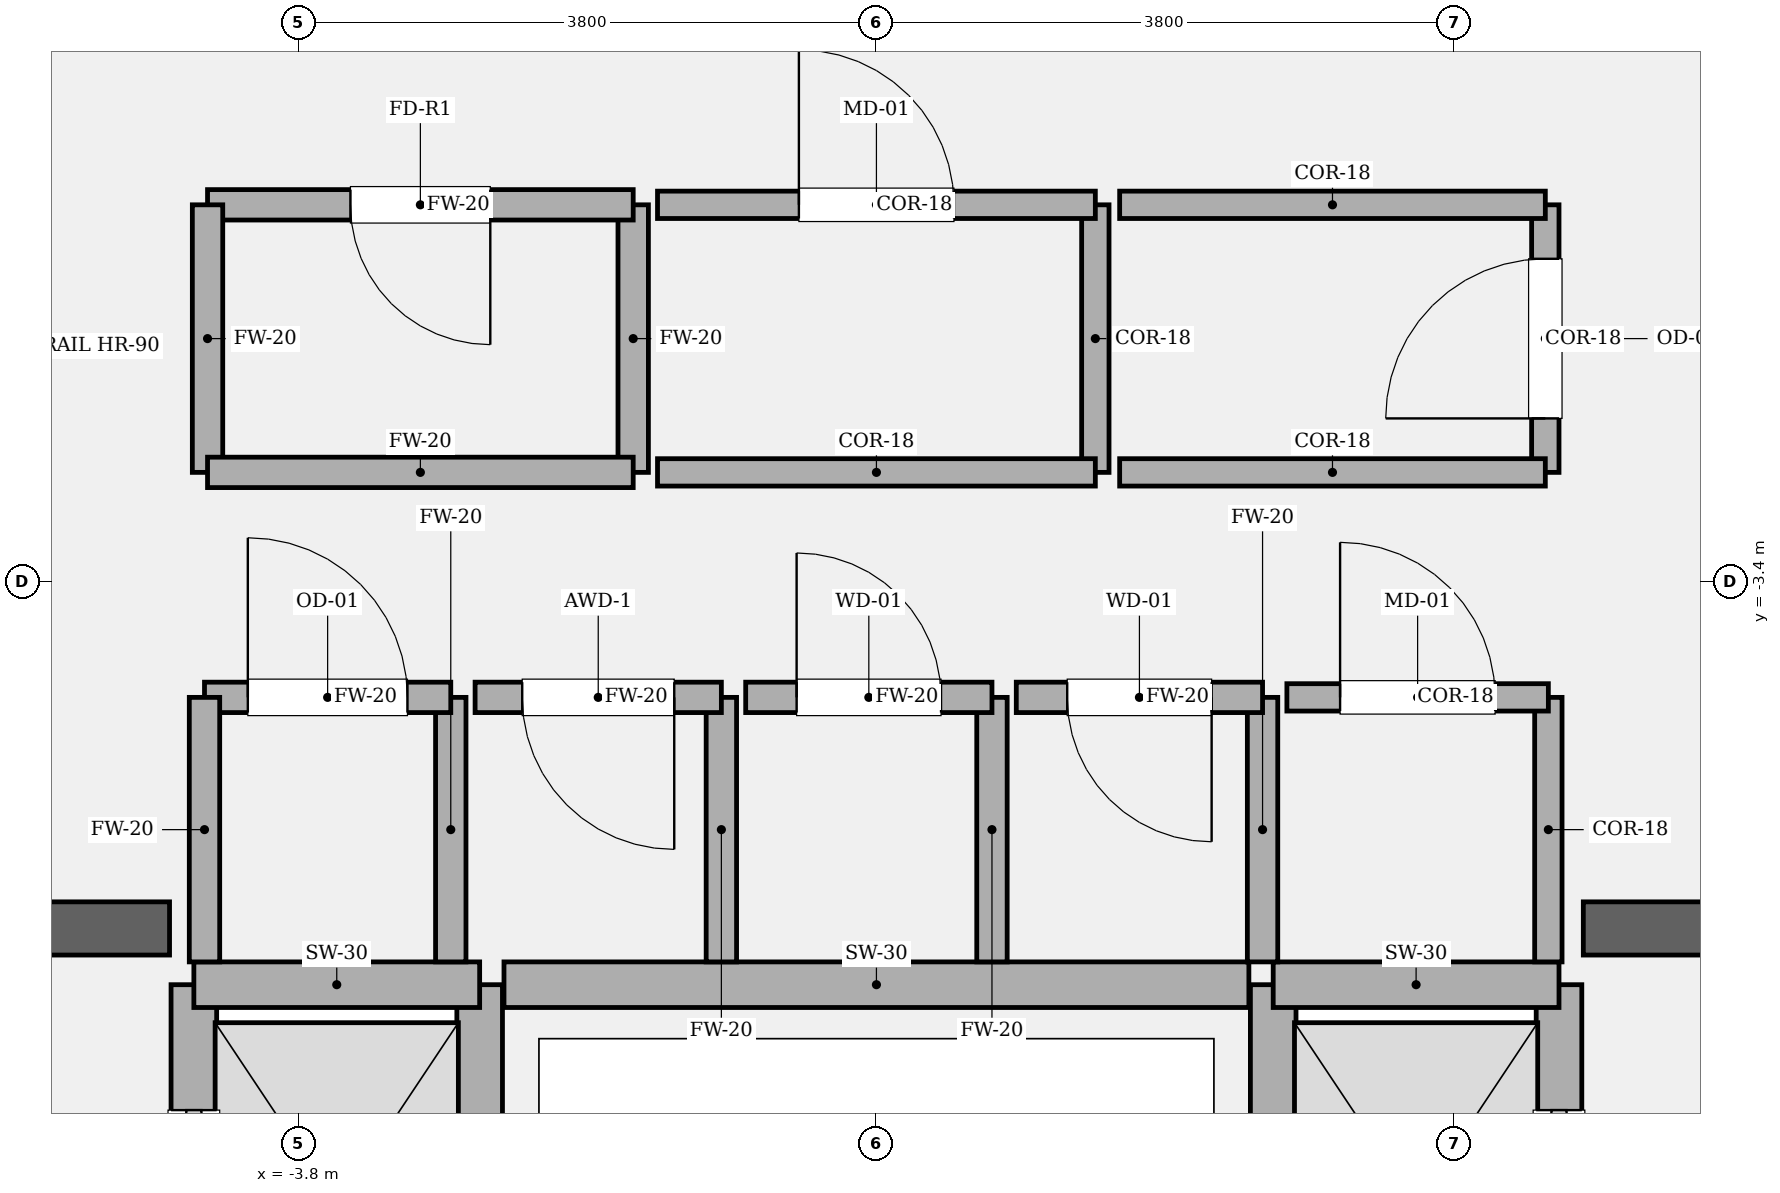
"""IFC4 building model, lengths in metres.
Left out: names, types, materials, properties, quantities, classifications, styles, units other than length and angle.
Written with IfcOpenShell. Run it as: python <this file> out.ifc"""

import sys

from ifc_helpers import new_model, si_unit, direction, frame, frame_2d, origin, place, context, subcontext, project, spatial, rectangle, extrude, element, fill, save


model = new_model("IFC4")
c1 = context("Model", 3, precision=1e-05, world=origin(), true_north=direction((0.0, 1.0)))
c2 = subcontext(c1, "Body", "Model", "MODEL_VIEW")
j1 = project(units=[si_unit("LENGTHUNIT", "METRE"), si_unit("PLANEANGLEUNIT", "RADIAN")], contexts=[c1])
p1 = place(None, origin())
s1 = spatial("IfcSite", under=j1, at=p1, CompositionType="ELEMENT")
p2 = place(p1, origin())
s2 = spatial("IfcBuilding", under=s1, at=p2, CompositionType="ELEMENT")
p3 = place(p2, frame((0.0, 0.0, 228.9)))
s3 = spatial("IfcBuildingStorey", under=s2, at=p3, CompositionType="ELEMENT", Elevation=228.9)
p4 = place(p3, frame((-9.875, -5.68, 0.0), z_axis=(0.0, 0.0, 1.0), x_axis=(1.0, 0.0, 0.0)))
e1 = element("IfcWall", 1, at=p4, inside=s3, PredefinedType="SOLIDWALL", context=c2, shape_type="SweptSolid", body=[
    extrude(rectangle(XDim=5.225, YDim=0.35, at=frame_2d((2.613, 0.0))), origin(), (0.0, 0.0, 1.0), 4.05),
])
p5 = place(p4, frame((1.335, 0.0, 0.0)))
e2 = element("IfcOpeningElement", 2, at=p5, cuts=e1, PredefinedType="OPENING", context=c2, shape_type="SweptSolid", body=[
    extrude(rectangle(XDim=1.18, YDim=2.2, at=frame_2d((0.59, 1.1))), frame((0.0, 0.185, 0.0), z_axis=(0.0, -1.0, 0.0), x_axis=(1.0, 0.0, 0.0)), (0.0, 0.0, 1.0), 0.37),
])
p6 = place(p3, frame((4.65, -5.68, 0.0), z_axis=(0.0, 0.0, 1.0), x_axis=(1.0, 0.0, 0.0)))
e3 = element("IfcWall", 3, at=p6, inside=s3, PredefinedType="SOLIDWALL", context=c2, shape_type="SweptSolid", body=[
    extrude(rectangle(XDim=5.225, YDim=0.35, at=frame_2d((2.613, 0.0))), origin(), (0.0, 0.0, 1.0), 4.05),
])
p7 = place(p6, frame((2.71, 0.0, 0.0)))
e4 = element("IfcOpeningElement", 4, at=p7, cuts=e3, PredefinedType="OPENING", context=c2, shape_type="SweptSolid", body=[
    extrude(rectangle(XDim=1.18, YDim=2.2, at=frame_2d((0.59, 1.1))), frame((0.0, 0.185, 0.0), z_axis=(0.0, -1.0, 0.0), x_axis=(1.0, 0.0, 0.0)), (0.0, 0.0, 1.0), 0.37),
])
p8 = place(p3, frame((-4.49, -8.82, 0.0), z_axis=(0.0, 0.0, 1.0), x_axis=(0.0, 1.0, 0.0)))
e5 = element("IfcWall", 5, at=p8, inside=s3, PredefinedType="SOLIDWALL", context=c2, shape_type="SweptSolid", body=[
    extrude(rectangle(XDim=2.77, YDim=0.3, at=frame_2d((1.385, 0.0))), origin(), (0.0, 0.0, 1.0), 3.83),
])
p9 = place(p8, frame((0.825, 0.0, 0.0)))
e6 = element("IfcOpeningElement", 6, at=p9, cuts=e5, PredefinedType="OPENING", context=c2, shape_type="SweptSolid", body=[
    extrude(rectangle(XDim=1.12, YDim=2.25, at=frame_2d((0.56, 1.125))), frame((0.0, 0.16, 0.0), z_axis=(0.0, -1.0, 0.0), x_axis=(1.0, 0.0, 0.0)), (0.0, 0.0, 1.0), 0.32),
])
p10 = place(p3, frame((-2.61, -8.82, 0.0), z_axis=(0.0, 0.0, 1.0), x_axis=(0.0, 1.0, 0.0)))
e7 = element("IfcWall", 7, at=p10, inside=s3, PredefinedType="SOLIDWALL", context=c2, shape_type="SweptSolid", body=[
    extrude(rectangle(XDim=2.77, YDim=0.3, at=frame_2d((1.385, 0.0))), origin(), (0.0, 0.0, 1.0), 3.83),
])
p11 = place(p3, frame((-4.49, -6.05, 0.0), z_axis=(0.0, 0.0, 1.0), x_axis=(1.0, 0.0, 0.0)))
e8 = element("IfcWall", 8, at=p11, inside=s3, PredefinedType="SOLIDWALL", context=c2, shape_type="SweptSolid", body=[
    extrude(rectangle(XDim=1.88, YDim=0.3, at=frame_2d((0.94, 0.0))), origin(), (0.0, 0.0, 1.0), 3.83),
])
p12 = place(p3, frame((4.49, -8.82, 0.0), z_axis=(0.0, 0.0, 1.0), x_axis=(0.0, 1.0, 0.0)))
e9 = element("IfcWall", 9, at=p12, inside=s3, PredefinedType="SOLIDWALL", context=c2, shape_type="SweptSolid", body=[
    extrude(rectangle(XDim=2.77, YDim=0.3, at=frame_2d((1.385, 0.0))), origin(), (0.0, 0.0, 1.0), 3.83),
])
p13 = place(p12, frame((0.825, 0.0, 0.0)))
e10 = element("IfcOpeningElement", 10, at=p13, cuts=e9, PredefinedType="OPENING", context=c2, shape_type="SweptSolid", body=[
    extrude(rectangle(XDim=1.12, YDim=2.25, at=frame_2d((0.56, 1.125))), frame((0.0, 0.16, 0.0), z_axis=(0.0, -1.0, 0.0), x_axis=(1.0, 0.0, 0.0)), (0.0, 0.0, 1.0), 0.32),
])
p14 = place(p3, frame((2.61, -8.82, 0.0), z_axis=(0.0, 0.0, 1.0), x_axis=(0.0, 1.0, 0.0)))
e11 = element("IfcWall", 11, at=p14, inside=s3, PredefinedType="SOLIDWALL", context=c2, shape_type="SweptSolid", body=[
    extrude(rectangle(XDim=2.77, YDim=0.3, at=frame_2d((1.385, 0.0))), origin(), (0.0, 0.0, 1.0), 3.83),
])
p15 = place(p3, frame((2.61, -6.05, 0.0), z_axis=(0.0, 0.0, 1.0), x_axis=(1.0, 0.0, 0.0)))
e12 = element("IfcWall", 12, at=p15, inside=s3, PredefinedType="SOLIDWALL", context=c2, shape_type="SweptSolid", body=[
    extrude(rectangle(XDim=1.88, YDim=0.3, at=frame_2d((0.94, 0.0))), origin(), (0.0, 0.0, 1.0), 3.83),
])
p16 = place(p3, frame((-2.45, -6.05, 0.0), z_axis=(0.0, 0.0, 1.0), x_axis=(1.0, 0.0, 0.0)))
e13 = element("IfcWall", 13, at=p16, inside=s3, PredefinedType="SOLIDWALL", context=c2, shape_type="SweptSolid", body=[
    extrude(rectangle(XDim=4.9, YDim=0.3, at=frame_2d((2.45, 0.0))), origin(), (0.0, 0.0, 1.0), 3.83),
])
p17 = place(p3, frame((-2.8, -5.9, 0.0), z_axis=(0.0, 0.0, 1.0), x_axis=(0.0, 1.0, 0.0)))
e14 = element("IfcWall", 14, at=p17, inside=s3, PredefinedType="SOLIDWALL", context=c2, shape_type="SweptSolid", body=[
    extrude(rectangle(XDim=1.74, YDim=0.2, at=frame_2d((0.87, 0.0))), origin(), (0.0, 0.0, 1.0), 3.83),
])
p18 = place(p3, frame((-2.8, -4.16, 0.0), z_axis=(0.0, 0.0, 1.0), x_axis=(-1.0, 0.0, 0.0)))
e15 = element("IfcWall", 15, at=p18, inside=s3, PredefinedType="SOLIDWALL", context=c2, shape_type="SweptSolid", body=[
    extrude(rectangle(XDim=1.62, YDim=0.2, at=frame_2d((0.81, 0.0))), origin(), (0.0, 0.0, 1.0), 3.83),
])
p19 = place(p18, frame((0.285, 0.0, 0.0)))
e16 = element("IfcOpeningElement", 16, at=p19, cuts=e15, PredefinedType="OPENING", context=c2, shape_type="SweptSolid", body=[
    extrude(rectangle(XDim=1.05, YDim=2.2, at=frame_2d((0.525, 1.1))), frame((0.0, 0.11, 0.0), z_axis=(0.0, -1.0, 0.0), x_axis=(1.0, 0.0, 0.0)), (0.0, 0.0, 1.0), 0.22),
])
for number, where, z_axis, x_axis in (
    (17, (-4.42, -4.16, 0.0), (0.0, 0.0, 1.0), (0.0, -1.0, 0.0)),
    (18, (-1.02, -5.9, 0.0), (0.0, 0.0, 1.0), (0.0, 1.0, 0.0)),
):
    element("IfcWall", number, at=place(p3, frame(where, z_axis=z_axis, x_axis=x_axis)), inside=s3, PredefinedType="SOLIDWALL", context=c2, shape_type="SweptSolid", body=[
        extrude(rectangle(XDim=1.74, YDim=0.2, at=frame_2d((0.87, 0.0))), origin(), (0.0, 0.0, 1.0), 3.83),
    ])
p20 = place(p3, frame((-1.02, -4.16, 0.0), z_axis=(0.0, 0.0, 1.0), x_axis=(-1.0, 0.0, 0.0)))
e19 = element("IfcWall", 19, at=p20, inside=s3, PredefinedType="SOLIDWALL", context=c2, shape_type="SweptSolid", body=[
    extrude(rectangle(XDim=1.62, YDim=0.2, at=frame_2d((0.81, 0.0))), origin(), (0.0, 0.0, 1.0), 3.83),
])
p21 = place(p20, frame((0.31, 0.0, 0.0)))
e20 = element("IfcOpeningElement", 20, at=p21, cuts=e19, PredefinedType="OPENING", context=c2, shape_type="SweptSolid", body=[
    extrude(rectangle(XDim=1.0, YDim=2.15, at=frame_2d((0.5, 1.075))), frame((0.0, 0.11, 0.0), z_axis=(0.0, -1.0, 0.0), x_axis=(1.0, 0.0, 0.0)), (0.0, 0.0, 1.0), 0.22),
])
p22 = place(p3, frame((0.76, -5.9, 0.0), z_axis=(0.0, 0.0, 1.0), x_axis=(0.0, 1.0, 0.0)))
e21 = element("IfcWall", 21, at=p22, inside=s3, PredefinedType="SOLIDWALL", context=c2, shape_type="SweptSolid", body=[
    extrude(rectangle(XDim=1.74, YDim=0.2, at=frame_2d((0.87, 0.0))), origin(), (0.0, 0.0, 1.0), 3.83),
])
p23 = place(p3, frame((0.76, -4.16, 0.0), z_axis=(0.0, 0.0, 1.0), x_axis=(-1.0, 0.0, 0.0)))
e22 = element("IfcWall", 22, at=p23, inside=s3, PredefinedType="SOLIDWALL", context=c2, shape_type="SweptSolid", body=[
    extrude(rectangle(XDim=1.62, YDim=0.2, at=frame_2d((0.81, 0.0))), origin(), (0.0, 0.0, 1.0), 3.83),
])
p24 = place(p23, frame((0.335, 0.0, 0.0)))
e23 = element("IfcOpeningElement", 23, at=p24, cuts=e22, PredefinedType="OPENING", context=c2, shape_type="SweptSolid", body=[
    extrude(rectangle(XDim=0.95, YDim=2.15, at=frame_2d((0.475, 1.075))), frame((0.0, 0.11, 0.0), z_axis=(0.0, -1.0, 0.0), x_axis=(1.0, 0.0, 0.0)), (0.0, 0.0, 1.0), 0.22),
])
p25 = place(p3, frame((2.54, -5.9, 0.0), z_axis=(0.0, 0.0, 1.0), x_axis=(0.0, 1.0, 0.0)))
e24 = element("IfcWall", 24, at=p25, inside=s3, PredefinedType="SOLIDWALL", context=c2, shape_type="SweptSolid", body=[
    extrude(rectangle(XDim=1.74, YDim=0.2, at=frame_2d((0.87, 0.0))), origin(), (0.0, 0.0, 1.0), 3.83),
])
p26 = place(p3, frame((2.54, -4.16, 0.0), z_axis=(0.0, 0.0, 1.0), x_axis=(-1.0, 0.0, 0.0)))
e25 = element("IfcWall", 25, at=p26, inside=s3, PredefinedType="SOLIDWALL", context=c2, shape_type="SweptSolid", body=[
    extrude(rectangle(XDim=1.62, YDim=0.2, at=frame_2d((0.81, 0.0))), origin(), (0.0, 0.0, 1.0), 3.83),
])
p27 = place(p26, frame((0.335, 0.0, 0.0)))
e26 = element("IfcOpeningElement", 26, at=p27, cuts=e25, PredefinedType="OPENING", context=c2, shape_type="SweptSolid", body=[
    extrude(rectangle(XDim=0.95, YDim=2.15, at=frame_2d((0.475, 1.075))), frame((0.0, 0.11, 0.0), z_axis=(0.0, -1.0, 0.0), x_axis=(1.0, 0.0, 0.0)), (0.0, 0.0, 1.0), 0.22),
])
p28 = place(p3, frame((4.42, -5.9, 0.0), z_axis=(0.0, 0.0, 1.0), x_axis=(0.0, 1.0, 0.0)))
e27 = element("IfcWall", 27, at=p28, inside=s3, PredefinedType="PARTITIONING", context=c2, shape_type="SweptSolid", body=[
    extrude(rectangle(XDim=1.74, YDim=0.18, at=frame_2d((0.87, 0.0))), origin(), (0.0, 0.0, 1.0), 3.83),
])
p29 = place(p3, frame((4.42, -4.16, 0.0), z_axis=(0.0, 0.0, 1.0), x_axis=(-1.0, 0.0, 0.0)))
e28 = element("IfcWall", 28, at=p29, inside=s3, PredefinedType="PARTITIONING", context=c2, shape_type="SweptSolid", body=[
    extrude(rectangle(XDim=1.72, YDim=0.18, at=frame_2d((0.86, 0.0))), origin(), (0.0, 0.0, 1.0), 3.83),
])
p30 = place(p29, frame((0.35, 0.0, 0.0)))
e29 = element("IfcOpeningElement", 29, at=p30, cuts=e28, PredefinedType="OPENING", context=c2, shape_type="SweptSolid", body=[
    extrude(rectangle(XDim=1.02, YDim=2.2, at=frame_2d((0.51, 1.1))), frame((0.0, 0.1, 0.0), z_axis=(0.0, -1.0, 0.0), x_axis=(1.0, 0.0, 0.0)), (0.0, 0.0, 1.0), 0.2),
])
p31 = place(p3, frame((-1.6, -2.68, 0.0), z_axis=(0.0, 0.0, 1.0), x_axis=(0.0, 1.0, 0.0)))
e30 = element("IfcWall", 30, at=p31, inside=s3, PredefinedType="SOLIDWALL", context=c2, shape_type="SweptSolid", body=[
    extrude(rectangle(XDim=1.76, YDim=0.2, at=frame_2d((0.88, 0.0))), origin(), (0.0, 0.0, 1.0), 3.83),
])
p32 = place(p3, frame((-1.6, -0.92, 0.0), z_axis=(0.0, 0.0, 1.0), x_axis=(-1.0, 0.0, 0.0)))
e31 = element("IfcWall", 31, at=p32, inside=s3, PredefinedType="SOLIDWALL", context=c2, shape_type="SweptSolid", body=[
    extrude(rectangle(XDim=2.8, YDim=0.2, at=frame_2d((1.4, 0.0))), origin(), (0.0, 0.0, 1.0), 3.83),
])
p33 = place(p32, frame((0.94, 0.0, 0.0)))
e32 = element("IfcOpeningElement", 32, at=p33, cuts=e31, PredefinedType="OPENING", context=c2, shape_type="SweptSolid", body=[
    extrude(rectangle(XDim=0.92, YDim=2.1, at=frame_2d((0.46, 1.05))), frame((0.0, 0.11, 0.0), z_axis=(0.0, -1.0, 0.0), x_axis=(1.0, 0.0, 0.0)), (0.0, 0.0, 1.0), 0.22),
])
p34 = place(p3, frame((-4.4, -0.92, 0.0), z_axis=(0.0, 0.0, 1.0), x_axis=(0.0, -1.0, 0.0)))
e33 = element("IfcWall", 33, at=p34, inside=s3, PredefinedType="SOLIDWALL", context=c2, shape_type="SweptSolid", body=[
    extrude(rectangle(XDim=1.76, YDim=0.2, at=frame_2d((0.88, 0.0))), origin(), (0.0, 0.0, 1.0), 3.83),
])
p35 = place(p3, frame((-4.4, -2.68, 0.0), z_axis=(0.0, 0.0, 1.0), x_axis=(1.0, 0.0, 0.0)))
e34 = element("IfcWall", 34, at=p35, inside=s3, PredefinedType="SOLIDWALL", context=c2, shape_type="SweptSolid", body=[
    extrude(rectangle(XDim=2.8, YDim=0.2, at=frame_2d((1.4, 0.0))), origin(), (0.0, 0.0, 1.0), 3.83),
])
p36 = place(p3, frame((1.44, -2.68, 0.0), z_axis=(0.0, 0.0, 1.0), x_axis=(0.0, 1.0, 0.0)))
e35 = element("IfcWall", 35, at=p36, inside=s3, PredefinedType="PARTITIONING", context=c2, shape_type="SweptSolid", body=[
    extrude(rectangle(XDim=1.76, YDim=0.18, at=frame_2d((0.88, 0.0))), origin(), (0.0, 0.0, 1.0), 3.83),
])
p37 = place(p3, frame((1.44, -0.92, 0.0), z_axis=(0.0, 0.0, 1.0), x_axis=(-1.0, 0.0, 0.0)))
e36 = element("IfcWall", 36, at=p37, inside=s3, PredefinedType="PARTITIONING", context=c2, shape_type="SweptSolid", body=[
    extrude(rectangle(XDim=2.88, YDim=0.18, at=frame_2d((1.44, 0.0))), origin(), (0.0, 0.0, 1.0), 3.83),
])
p38 = place(p37, frame((0.93, 0.0, 0.0)))
e37 = element("IfcOpeningElement", 37, at=p38, cuts=e36, PredefinedType="OPENING", context=c2, shape_type="SweptSolid", body=[
    extrude(rectangle(XDim=1.02, YDim=2.2, at=frame_2d((0.51, 1.1))), frame((0.0, 0.1, 0.0), z_axis=(0.0, -1.0, 0.0), x_axis=(1.0, 0.0, 0.0)), (0.0, 0.0, 1.0), 0.2),
])
p39 = place(p3, frame((-1.44, -2.68, 0.0), z_axis=(0.0, 0.0, 1.0), x_axis=(1.0, 0.0, 0.0)))
e38 = element("IfcWall", 38, at=p39, inside=s3, PredefinedType="PARTITIONING", context=c2, shape_type="SweptSolid", body=[
    extrude(rectangle(XDim=2.88, YDim=0.18, at=frame_2d((1.44, 0.0))), origin(), (0.0, 0.0, 1.0), 3.83),
])
p40 = place(p3, frame((4.4, -2.68, 0.0), z_axis=(0.0, 0.0, 1.0), x_axis=(0.0, 1.0, 0.0)))
e39 = element("IfcWall", 39, at=p40, inside=s3, PredefinedType="PARTITIONING", context=c2, shape_type="SweptSolid", body=[
    extrude(rectangle(XDim=1.76, YDim=0.18, at=frame_2d((0.88, 0.0))), origin(), (0.0, 0.0, 1.0), 3.83),
])
p41 = place(p40, frame((0.355, 0.0, 0.0)))
e40 = element("IfcOpeningElement", 40, at=p41, cuts=e39, PredefinedType="OPENING", context=c2, shape_type="SweptSolid", body=[
    extrude(rectangle(XDim=1.05, YDim=2.2, at=frame_2d((0.525, 1.1))), frame((0.0, 0.1, 0.0), z_axis=(0.0, -1.0, 0.0), x_axis=(1.0, 0.0, 0.0)), (0.0, 0.0, 1.0), 0.2),
])
for number, where, z_axis, x_axis in (
    (41, (4.4, -0.92, 0.0), (0.0, 0.0, 1.0), (-1.0, 0.0, 0.0)),
    (42, (1.6, -2.68, 0.0), (0.0, 0.0, 1.0), (1.0, 0.0, 0.0)),
):
    element("IfcWall", number, at=place(p3, frame(where, z_axis=z_axis, x_axis=x_axis)), inside=s3, PredefinedType="PARTITIONING", context=c2, shape_type="SweptSolid", body=[
        extrude(rectangle(XDim=2.8, YDim=0.18, at=frame_2d((1.4, 0.0))), origin(), (0.0, 0.0, 1.0), 3.83),
    ])
p42 = place(p9, origin())
e43 = element("IfcDoor", 43, at=p42, inside=s3, OperationType="SLIDING_TO_LEFT", PredefinedType="DOOR", context=c2, shape_type="SweptSolid", body=[
    extrude(rectangle(XDim=1.12, YDim=2.25, at=frame_2d((0.56, 1.125))), frame((0.0, 0.025, 0.0), z_axis=(0.0, -1.0, 0.0), x_axis=(1.0, 0.0, 0.0)), (0.0, 0.0, 1.0), 0.05),
])
fill(e6, e43)
p43 = place(p13, origin())
e44 = element("IfcDoor", 44, at=p43, inside=s3, OperationType="SLIDING_TO_RIGHT", PredefinedType="DOOR", context=c2, shape_type="SweptSolid", body=[
    extrude(rectangle(XDim=1.12, YDim=2.25, at=frame_2d((0.56, 1.125))), frame((0.0, 0.025, 0.0), z_axis=(0.0, -1.0, 0.0), x_axis=(1.0, 0.0, 0.0)), (0.0, 0.0, 1.0), 0.05),
])
fill(e10, e44)
p44 = place(p19, origin())
e45 = element("IfcDoor", 45, at=p44, inside=s3, OperationType="SINGLE_SWING_RIGHT", PredefinedType="DOOR", context=c2, shape_type="SweptSolid", body=[
    extrude(rectangle(XDim=1.05, YDim=2.2, at=frame_2d((0.525, 1.1))), frame((0.0, 0.025, 0.0), z_axis=(0.0, -1.0, 0.0), x_axis=(1.0, 0.0, 0.0)), (0.0, 0.0, 1.0), 0.05),
])
fill(e16, e45)
p45 = place(p21, origin())
e46 = element("IfcDoor", 46, at=p45, inside=s3, OperationType="SINGLE_SWING_LEFT", PredefinedType="DOOR", context=c2, shape_type="SweptSolid", body=[
    extrude(rectangle(XDim=1.0, YDim=2.15, at=frame_2d((0.5, 1.075))), frame((0.0, 0.025, 0.0), z_axis=(0.0, -1.0, 0.0), x_axis=(1.0, 0.0, 0.0)), (0.0, 0.0, 1.0), 0.05),
])
fill(e20, e46)
p46 = place(p24, origin())
e47 = element("IfcDoor", 47, at=p46, inside=s3, OperationType="SINGLE_SWING_RIGHT", PredefinedType="DOOR", context=c2, shape_type="SweptSolid", body=[
    extrude(rectangle(XDim=0.95, YDim=2.15, at=frame_2d((0.475, 1.075))), frame((0.0, 0.025, 0.0), z_axis=(0.0, -1.0, 0.0), x_axis=(1.0, 0.0, 0.0)), (0.0, 0.0, 1.0), 0.05),
])
fill(e23, e47)
p47 = place(p27, origin())
e48 = element("IfcDoor", 48, at=p47, inside=s3, OperationType="SINGLE_SWING_LEFT", PredefinedType="DOOR", context=c2, shape_type="SweptSolid", body=[
    extrude(rectangle(XDim=0.95, YDim=2.15, at=frame_2d((0.475, 1.075))), frame((0.0, 0.025, 0.0), z_axis=(0.0, -1.0, 0.0), x_axis=(1.0, 0.0, 0.0)), (0.0, 0.0, 1.0), 0.05),
])
fill(e26, e48)
p48 = place(p30, origin())
e49 = element("IfcDoor", 49, at=p48, inside=s3, OperationType="SINGLE_SWING_RIGHT", PredefinedType="DOOR", context=c2, shape_type="SweptSolid", body=[
    extrude(rectangle(XDim=1.02, YDim=2.2, at=frame_2d((0.51, 1.1))), frame((0.0, 0.025, 0.0), z_axis=(0.0, -1.0, 0.0), x_axis=(1.0, 0.0, 0.0)), (0.0, 0.0, 1.0), 0.05),
])
fill(e29, e49)
p49 = place(p33, origin())
e50 = element("IfcDoor", 50, at=p49, inside=s3, OperationType="SINGLE_SWING_LEFT", PredefinedType="DOOR", context=c2, shape_type="SweptSolid", body=[
    extrude(rectangle(XDim=0.92, YDim=2.1, at=frame_2d((0.46, 1.05))), frame((0.0, 0.025, 0.0), z_axis=(0.0, -1.0, 0.0), x_axis=(1.0, 0.0, 0.0)), (0.0, 0.0, 1.0), 0.05),
])
fill(e32, e50)
p50 = place(p38, origin())
e51 = element("IfcDoor", 51, at=p50, inside=s3, OperationType="SINGLE_SWING_RIGHT", PredefinedType="DOOR", context=c2, shape_type="SweptSolid", body=[
    extrude(rectangle(XDim=1.02, YDim=2.2, at=frame_2d((0.51, 1.1))), frame((0.0, 0.025, 0.0), z_axis=(0.0, -1.0, 0.0), x_axis=(1.0, 0.0, 0.0)), (0.0, 0.0, 1.0), 0.05),
])
fill(e37, e51)
p51 = place(p41, origin())
e52 = element("IfcDoor", 52, at=p51, inside=s3, OperationType="SINGLE_SWING_LEFT", PredefinedType="DOOR", context=c2, shape_type="SweptSolid", body=[
    extrude(rectangle(XDim=1.05, YDim=2.2, at=frame_2d((0.525, 1.1))), frame((0.0, 0.025, 0.0), z_axis=(0.0, -1.0, 0.0), x_axis=(1.0, 0.0, 0.0)), (0.0, 0.0, 1.0), 0.05),
])
fill(e40, e52)
save(model, sys.argv[1])
